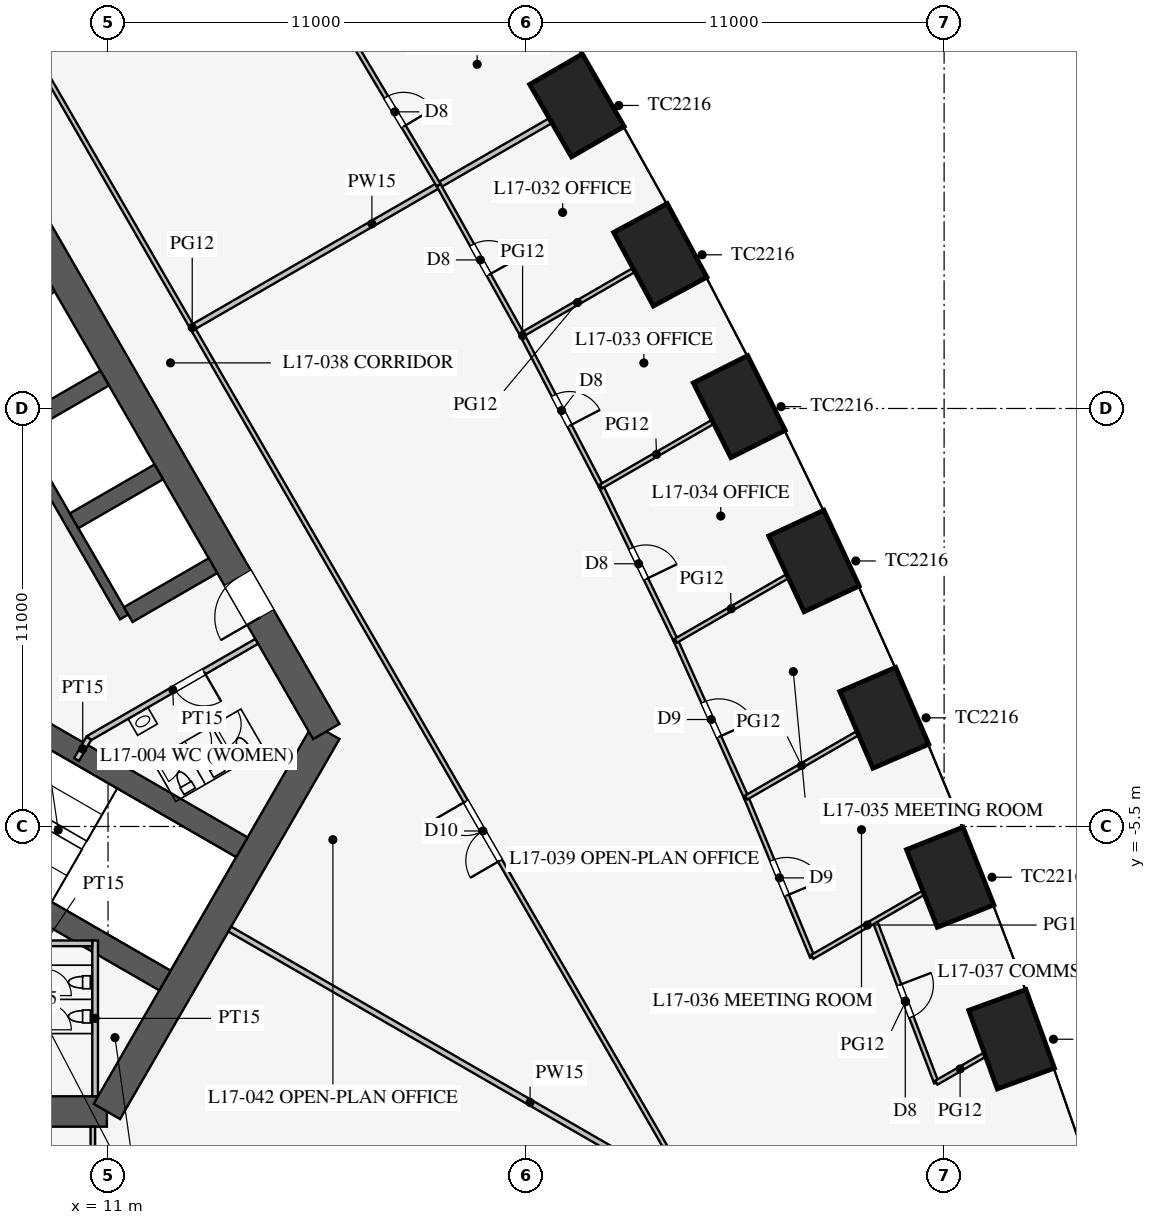
"""IFC4 building model, lengths in metres.
Left out: names, types, materials, properties, quantities, classifications, styles, units other than length and angle.
Written with IfcOpenShell. Run it as: python <this file> out.ifc"""

import sys

from ifc_helpers import new_model, si_unit, direction, frame, frame_2d, origin, origin_2d, place, context, subcontext, project, spatial, rectangle, extrude, element, fill, save


model = new_model("IFC4")
c1 = context("Model", 3, precision=1e-05, world=origin(), true_north=direction((0.0, 1.0)))
c2 = subcontext(c1, "Body", "Model", "MODEL_VIEW")
j1 = project(units=[si_unit("LENGTHUNIT", "METRE"), si_unit("PLANEANGLEUNIT", "RADIAN")], contexts=[c1])
p1 = place(None, origin())
s1 = spatial("IfcSite", under=j1, at=p1, CompositionType="ELEMENT")
p2 = place(p1, origin())
s2 = spatial("IfcBuilding", under=s1, at=p2, CompositionType="ELEMENT")
p3 = place(p2, frame((0.0, 0.0, 75.3)))
s3 = spatial("IfcBuildingStorey", under=s2, at=p3, CompositionType="ELEMENT", Elevation=75.3)
for number, where, z_axis, x_axis in (
    (1, (34.776, -11.099, 0.0), (0.0, 0.0, 1.0), (-0.342, 0.94, 0.0)),
    (2, (33.16, -6.836, 0.0), (0.0, 0.0, 1.0), (-0.369, 0.929, 0.0)),
    (3, (31.426, -2.641, 0.0), (0.0, 0.0, 1.0), (-0.396, 0.918, 0.0)),
    (4, (29.576, 1.487, 0.0), (0.0, 0.0, 1.0), (-0.423, 0.906, 0.0)),
    (5, (27.611, 5.549, 0.0), (0.0, 0.0, 1.0), (-0.449, 0.894, 0.0)),
    (6, (25.531, 9.544, 0.0), (0.0, 0.0, 1.0), (-0.475, 0.88, 0.0)),
    (7, (23.338, 13.474, 0.0), (0.0, 0.0, 1.0), (-0.5, 0.866, 0.0)),
):
    element("IfcColumn", number, at=place(p3, frame(where, z_axis=z_axis, x_axis=x_axis)), inside=s3, PredefinedType="COLUMN", context=c2, shape_type="SweptSolid", body=[
        extrude(rectangle(XDim=2.2, YDim=1.6, at=origin_2d()), origin(), (0.0, 0.0, 1.0), 4.2),
    ])
p4 = place(p3, frame((-10.97, -13.0, 0.0), z_axis=(0.0, 0.0, 1.0), x_axis=(1.0, 0.0, 0.0)))
e8 = element("IfcWall", 8, at=p4, inside=s3, PredefinedType="SHEAR", context=c2, shape_type="SweptSolid", body=[
    extrude(rectangle(XDim=21.939, YDim=0.8, at=frame_2d((10.97, 0.0))), origin(), (0.0, 0.0, 1.0), 4.2),
])
p5 = place(p4, frame((17.27, 0.0, 0.0)))
e9 = element("IfcOpeningElement", 9, at=p5, cuts=e8, PredefinedType="OPENING", context=c2, shape_type="SweptSolid", body=[
    extrude(rectangle(XDim=1.2, YDim=2.1, at=frame_2d((0.6, 1.05))), frame((0.0, 0.41, 0.0), z_axis=(0.0, -1.0, 0.0), x_axis=(1.0, 0.0, 0.0)), (0.0, 0.0, 1.0), 0.82),
])
p6 = place(p4, frame((3.47, 0.0, 0.0)))
e10 = element("IfcOpeningElement", 10, at=p6, cuts=e8, PredefinedType="OPENING", context=c2, shape_type="SweptSolid", body=[
    extrude(rectangle(XDim=1.2, YDim=2.1, at=frame_2d((0.6, 1.05))), frame((0.0, 0.41, 0.0), z_axis=(0.0, -1.0, 0.0), x_axis=(1.0, 0.0, 0.0)), (0.0, 0.0, 1.0), 0.82),
])
p7 = place(p3, frame((10.97, -13.0, 0.0), z_axis=(0.0, 0.0, 1.0), x_axis=(0.499995765644, 0.866027848477, 0.0)))
e11 = element("IfcWall", 11, at=p7, inside=s3, PredefinedType="SHEAR", context=c2, shape_type="SweptSolid", body=[
    extrude(rectangle(XDim=11.547, YDim=0.8, at=frame_2d((5.773, 0.0))), origin(), (0.0, 0.0, 1.0), 4.2),
])
p8 = place(p3, frame((16.743, -3.0, 0.0), z_axis=(0.0, 0.0, 1.0), x_axis=(-0.500002442456, 0.866023993627, 0.0)))
e12 = element("IfcWall", 12, at=p8, inside=s3, PredefinedType="SHEAR", context=c2, shape_type="SweptSolid", body=[
    extrude(rectangle(XDim=21.939, YDim=0.8, at=frame_2d((10.97, 0.0))), origin(), (0.0, 0.0, 1.0), 4.2),
])
p9 = place(p8, frame((17.27, 0.0, 0.0)))
e13 = element("IfcOpeningElement", 13, at=p9, cuts=e12, PredefinedType="OPENING", context=c2, shape_type="SweptSolid", body=[
    extrude(rectangle(XDim=1.2, YDim=2.1, at=frame_2d((0.6, 1.05))), frame((0.0, 0.41, 0.0), z_axis=(0.0, -1.0, 0.0), x_axis=(1.0, 0.0, 0.0)), (0.0, 0.0, 1.0), 0.82),
])
p10 = place(p8, frame((3.47, 0.0, 0.0)))
e14 = element("IfcOpeningElement", 14, at=p10, cuts=e12, PredefinedType="OPENING", context=c2, shape_type="SweptSolid", body=[
    extrude(rectangle(XDim=1.2, YDim=2.1, at=frame_2d((0.6, 1.05))), frame((0.0, 0.41, 0.0), z_axis=(0.0, -1.0, 0.0), x_axis=(1.0, 0.0, 0.0)), (0.0, 0.0, 1.0), 0.82),
])
p11 = place(p3, frame((11.424, 0.014, 0.0), z_axis=(0.0, 0.0, 1.0), x_axis=(-0.500001763848, 0.866024385424, 0.0)))
e15 = element("IfcWall", 15, at=p11, inside=s3, PredefinedType="SHEAR", context=c2, shape_type="SweptSolid", body=[
    extrude(rectangle(XDim=11.4, YDim=0.25, at=frame_2d((5.7, 0.0))), origin(), (0.0, 0.0, 1.0), 4.2),
])
for number, where, z_axis, x_axis in (
    (16, (11.532, 0.076, 0.0), (0.0, 0.0, 1.0), (0.866, 0.5, 0.0)),
    (17, (10.107, 2.544, 0.0), (0.0, 0.0, 1.0), (0.866, 0.5, 0.0)),
    (18, (8.682, 5.012, 0.0), (0.0, 0.0, 1.0), (0.866, 0.5, 0.0)),
    (19, (7.257, 7.481, 0.0), (0.0, 0.0, 1.0), (0.866, 0.5, 0.0)),
):
    element("IfcWall", number, at=place(p3, frame(where, z_axis=z_axis, x_axis=x_axis)), inside=s3, PredefinedType="SHEAR", context=c2, shape_type="SweptSolid", body=[
        extrude(rectangle(XDim=2.575, YDim=0.45, at=frame_2d((1.288, 0.0))), origin(), (0.0, 0.0, 1.0), 4.2),
    ])
for number, where, z_axis, x_axis in (
    (20, (4.638, -5.016, 0.0), (0.0, 0.0, 1.0), (0.866, -0.5, 0.0)),
    (21, (6.663, -1.509, 0.0), (0.0, 0.0, 1.0), (0.866, -0.5, 0.0)),
):
    element("IfcWall", number, at=place(p3, frame(where, z_axis=z_axis, x_axis=x_axis)), inside=s3, PredefinedType="SHEAR", context=c2, shape_type="SweptSolid", body=[
        extrude(rectangle(XDim=9.075, YDim=0.6, at=frame_2d((4.538, 0.0))), origin(), (0.0, 0.0, 1.0), 4.2),
    ])
p12 = place(p3, frame((10.495, -3.178, 0.0), z_axis=(0.0, 0.0, 1.0), x_axis=(0.86602216432, 0.500005610874, 0.0)))
e22 = element("IfcWall", 22, at=p12, inside=s3, PredefinedType="PARTITIONING", context=c2, shape_type="SweptSolid", body=[
    extrude(rectangle(XDim=5.1, YDim=0.15, at=frame_2d((2.55, 0.0))), origin(), (0.0, 0.0, 1.0), 4.0),
])
p13 = place(p12, frame((2.6, 0.0, 0.0)))
e23 = element("IfcOpeningElement", 23, at=p13, cuts=e22, PredefinedType="OPENING", context=c2, shape_type="SweptSolid", body=[
    extrude(rectangle(XDim=0.9, YDim=2.1, at=frame_2d((0.45, 1.05))), frame((0.0, 0.085, 0.0), z_axis=(0.0, -1.0, 0.0), x_axis=(1.0, 0.0, 0.0)), (0.0, 0.0, 1.0), 0.17),
])
p14 = place(p3, frame((10.495, -3.178, 0.0), z_axis=(0.0, 0.0, 1.0), x_axis=(-0.499842556608, -0.866116284689, 0.0)))
e24 = element("IfcWall", 24, at=p14, inside=s3, PredefinedType="PARTITIONING", context=c2, shape_type="SweptSolid", body=[
    extrude(rectangle(XDim=0.645, YDim=0.15, at=frame_2d((0.323, 0.0))), origin(), (0.0, 0.0, 1.0), 4.0),
])
p15 = place(p3, frame((10.66, -8.5, 0.0), z_axis=(0.0, 0.0, 1.0), x_axis=(0.0, -1.0, 0.0)))
e25 = element("IfcWall", 25, at=p15, inside=s3, PredefinedType="PARTITIONING", context=c2, shape_type="SweptSolid", body=[
    extrude(rectangle(XDim=4.1, YDim=0.15, at=frame_2d((2.05, 0.0))), origin(), (0.0, 0.0, 1.0), 4.0),
])
p16 = place(p3, frame((8.075, -8.575, 0.0), z_axis=(0.0, 0.0, 1.0), x_axis=(1.0, 0.0, 0.0)))
e26 = element("IfcWall", 26, at=p16, inside=s3, PredefinedType="PARTITIONING", context=c2, shape_type="SweptSolid", body=[
    extrude(rectangle(XDim=2.51, YDim=0.15, at=frame_2d((1.255, 0.0))), origin(), (0.0, 0.0, 1.0), 4.0),
])
p17 = place(p3, frame((14.203, -8.2, 0.0), z_axis=(0.0, 0.0, 1.0), x_axis=(0.866024965723, -0.500000758745, 0.0)))
e27 = element("IfcWall", 27, at=p17, inside=s3, PredefinedType="PARTITIONING", context=c2, shape_type="SweptSolid", body=[
    extrude(rectangle(XDim=18.25, YDim=0.15, at=frame_2d((9.125, 0.0))), origin(), (0.0, 0.0, 1.0), 2.3),
])
p18 = place(p3, frame((10.6, -13.4, 0.0), z_axis=(0.0, 0.0, 1.0), x_axis=(0.0, -1.0, 0.0)))
e28 = element("IfcWall", 28, at=p18, inside=s3, PredefinedType="PARTITIONING", context=c2, shape_type="SweptSolid", body=[
    extrude(rectangle(XDim=4.0, YDim=0.12, at=frame_2d((2.0, 0.0))), origin(), (0.0, 0.0, 1.0), 2.9),
])
p19 = place(p3, frame((13.268, 7.66, 0.0), z_axis=(0.0, 0.0, 1.0), x_axis=(0.866019550038, 0.50001013885, 0.0)))
e29 = element("IfcWall", 29, at=p19, inside=s3, PredefinedType="PARTITIONING", context=c2, shape_type="SweptSolid", body=[
    extrude(rectangle(XDim=10.799, YDim=0.15, at=frame_2d((5.399, 0.0))), origin(), (0.0, 0.0, 1.0), 2.8),
])
p20 = place(p3, frame((26.415, -15.231, 0.0), z_axis=(0.0, 0.0, 1.0), x_axis=(-0.50000091641, 0.866024874695, 0.0)))
e30 = element("IfcWall", 30, at=p20, inside=s3, PredefinedType="PARTITIONING", context=c2, shape_type="SweptSolid", body=[
    extrude(rectangle(XDim=52.796, YDim=0.12, at=frame_2d((26.398, 0.0))), origin(), (0.0, 0.0, 1.0), 2.9),
])
p21 = place(p20, frame((10.2, 0.0, 0.15)))
e31 = element("IfcOpeningElement", 31, at=p21, cuts=e30, PredefinedType="OPENING", context=c2, shape_type="SweptSolid", body=[
    extrude(rectangle(XDim=1.8, YDim=2.1, at=frame_2d((0.9, 1.05))), frame((0.0, 0.07, 0.0), z_axis=(0.0, -1.0, 0.0), x_axis=(1.0, 0.0, 0.0)), (0.0, 0.0, 1.0), 0.14),
])
p22 = place(p20, frame((40.8, 0.0, 0.15)))
e32 = element("IfcOpeningElement", 32, at=p22, cuts=e30, PredefinedType="OPENING", context=c2, shape_type="SweptSolid", body=[
    extrude(rectangle(XDim=1.8, YDim=2.1, at=frame_2d((0.9, 1.05))), frame((0.0, 0.07, 0.0), z_axis=(0.0, -1.0, 0.0), x_axis=(1.0, 0.0, 0.0)), (0.0, 0.0, 1.0), 0.14),
])
p23 = place(p3, frame((19.701, 11.374, 0.0), z_axis=(0.0, 0.0, 1.0), x_axis=(-0.512483962191, 0.858696796604, 0.0)))
e33 = element("IfcWall", 33, at=p23, inside=s3, PredefinedType="PARTITIONING", context=c2, shape_type="SweptSolid", body=[
    extrude(rectangle(XDim=4.5, YDim=0.12, at=frame_2d((2.25, 0.0))), origin(), (0.0, 0.0, 1.0), 2.9),
])
p24 = place(p23, frame((1.8, 0.0, 0.15)))
e34 = element("IfcOpeningElement", 34, at=p24, cuts=e33, PredefinedType="OPENING", context=c2, shape_type="SweptSolid", body=[
    extrude(rectangle(XDim=0.9, YDim=2.1, at=frame_2d((0.45, 1.05))), frame((0.0, 0.07, 0.0), z_axis=(0.0, -1.0, 0.0), x_axis=(1.0, 0.0, 0.0)), (0.0, 0.0, 1.0), 0.14),
])
p25 = place(p3, frame((25.941, -0.611, 0.0), z_axis=(0.0, 0.0, 1.0), x_axis=(-0.435857917556, 0.900015486369, 0.0)))
e35 = element("IfcWall", 35, at=p25, inside=s3, PredefinedType="PARTITIONING", context=c2, shape_type="SweptSolid", body=[
    extrude(rectangle(XDim=4.512, YDim=0.12, at=frame_2d((2.256, 0.0))), origin(), (0.0, 0.0, 1.0), 2.9),
])
p26 = place(p25, frame((1.8, 0.0, 0.15)))
e36 = element("IfcOpeningElement", 36, at=p26, cuts=e35, PredefinedType="OPENING", context=c2, shape_type="SweptSolid", body=[
    extrude(rectangle(XDim=0.9, YDim=2.1, at=frame_2d((0.45, 1.05))), frame((0.0, 0.07, 0.0), z_axis=(0.0, -1.0, 0.0), x_axis=(1.0, 0.0, 0.0)), (0.0, 0.0, 1.0), 0.14),
])
p27 = place(p3, frame((27.793, -4.738, 0.0), z_axis=(0.0, 0.0, 1.0), x_axis=(-0.409451055745, 0.912332084796, 0.0)))
e37 = element("IfcWall", 37, at=p27, inside=s3, PredefinedType="PARTITIONING", context=c2, shape_type="SweptSolid", body=[
    extrude(rectangle(XDim=4.523, YDim=0.12, at=frame_2d((2.262, 0.0))), origin(), (0.0, 0.0, 1.0), 2.9),
])
p28 = place(p27, frame((1.75, 0.0, 0.15)))
e38 = element("IfcOpeningElement", 38, at=p28, cuts=e37, PredefinedType="OPENING", context=c2, shape_type="SweptSolid", body=[
    extrude(rectangle(XDim=1.0, YDim=2.1, at=frame_2d((0.5, 1.05))), frame((0.0, 0.07, 0.0), z_axis=(0.0, -1.0, 0.0), x_axis=(1.0, 0.0, 0.0)), (0.0, 0.0, 1.0), 0.14),
])
p29 = place(p3, frame((29.53, -8.932, 0.0), z_axis=(0.0, 0.0, 1.0), x_axis=(-0.382639984525, 0.923897527999, 0.0)))
e39 = element("IfcWall", 39, at=p29, inside=s3, PredefinedType="PARTITIONING", context=c2, shape_type="SweptSolid", body=[
    extrude(rectangle(XDim=4.539, YDim=0.12, at=frame_2d((2.27, 0.0))), origin(), (0.0, 0.0, 1.0), 2.9),
])
p30 = place(p29, frame((1.75, 0.0, 0.15)))
e40 = element("IfcOpeningElement", 40, at=p30, cuts=e39, PredefinedType="OPENING", context=c2, shape_type="SweptSolid", body=[
    extrude(rectangle(XDim=1.0, YDim=2.1, at=frame_2d((0.5, 1.05))), frame((0.0, 0.07, 0.0), z_axis=(0.0, -1.0, 0.0), x_axis=(1.0, 0.0, 0.0)), (0.0, 0.0, 1.0), 0.14),
])
p31 = place(p3, frame((32.795, -12.242, 0.0), z_axis=(0.0, 0.0, 1.0), x_axis=(-0.355369393324, 0.934725946087, 0.0)))
e41 = element("IfcWall", 41, at=p31, inside=s3, PredefinedType="PARTITIONING", context=c2, shape_type="SweptSolid", body=[
    extrude(rectangle(XDim=4.558, YDim=0.12, at=frame_2d((2.279, 0.0))), origin(), (0.0, 0.0, 1.0), 2.9),
])
p32 = place(p31, frame((1.85, 0.0, 0.15)))
e42 = element("IfcOpeningElement", 42, at=p32, cuts=e41, PredefinedType="OPENING", context=c2, shape_type="SweptSolid", body=[
    extrude(rectangle(XDim=0.9, YDim=2.1, at=frame_2d((0.45, 1.05))), frame((0.0, 0.07, 0.0), z_axis=(0.0, -1.0, 0.0), x_axis=(1.0, 0.0, 0.0)), (0.0, 0.0, 1.0), 0.14),
])
p33 = place(p3, frame((21.895, 7.445, 0.0), z_axis=(0.0, 0.0, 1.0), x_axis=(-0.487415216275, 0.87317031955, 0.0)))
e43 = element("IfcWall", 43, at=p33, inside=s3, PredefinedType="PARTITIONING", context=c2, shape_type="SweptSolid", body=[
    extrude(rectangle(XDim=4.5, YDim=0.12, at=frame_2d((2.25, 0.0))), origin(), (0.0, 0.0, 1.0), 2.9),
])
p34 = place(p33, frame((1.8, 0.0, 0.15)))
e44 = element("IfcOpeningElement", 44, at=p34, cuts=e43, PredefinedType="OPENING", context=c2, shape_type="SweptSolid", body=[
    extrude(rectangle(XDim=0.9, YDim=2.1, at=frame_2d((0.45, 1.05))), frame((0.0, 0.07, 0.0), z_axis=(0.0, -1.0, 0.0), x_axis=(1.0, 0.0, 0.0)), (0.0, 0.0, 1.0), 0.14),
])
p35 = place(p3, frame((23.975, 3.449, 0.0), z_axis=(0.0, 0.0, 1.0), x_axis=(-0.461810056307, 0.886978845235, 0.0)))
e45 = element("IfcWall", 45, at=p35, inside=s3, PredefinedType="PARTITIONING", context=c2, shape_type="SweptSolid", body=[
    extrude(rectangle(XDim=4.504, YDim=0.12, at=frame_2d((2.252, 0.0))), origin(), (0.0, 0.0, 1.0), 2.9),
])
p36 = place(p35, frame((1.8, 0.0, 0.15)))
e46 = element("IfcOpeningElement", 46, at=p36, cuts=e45, PredefinedType="OPENING", context=c2, shape_type="SweptSolid", body=[
    extrude(rectangle(XDim=0.9, YDim=2.1, at=frame_2d((0.45, 1.05))), frame((0.0, 0.07, 0.0), z_axis=(0.0, -1.0, 0.0), x_axis=(1.0, 0.0, 0.0)), (0.0, 0.0, 1.0), 0.14),
])
p37 = place(p3, frame((25.941, -0.611, 0.0), z_axis=(0.0, 0.0, 1.0), x_axis=(0.866023625329, 0.500003080363, 0.0)))
e47 = element("IfcWall", 47, at=p37, inside=s3, PredefinedType="PARTITIONING", context=c2, shape_type="SweptSolid", body=[
    extrude(rectangle(XDim=3.364, YDim=0.12, at=frame_2d((1.682, 0.0))), origin(), (0.0, 0.0, 1.0), 2.6),
])
p38 = place(p3, frame((27.793, -4.738, 0.0), z_axis=(0.0, 0.0, 1.0), x_axis=(0.866029446706, 0.499992997389, 0.0)))
e48 = element("IfcWall", 48, at=p38, inside=s3, PredefinedType="PARTITIONING", context=c2, shape_type="SweptSolid", body=[
    extrude(rectangle(XDim=3.359, YDim=0.12, at=frame_2d((1.679, 0.0))), origin(), (0.0, 0.0, 1.0), 2.6),
])
p39 = place(p3, frame((29.53, -8.932, 0.0), z_axis=(0.0, 0.0, 1.0), x_axis=(0.866038859646, 0.49997669304, 0.0)))
e49 = element("IfcWall", 49, at=p39, inside=s3, PredefinedType="PARTITIONING", context=c2, shape_type="SweptSolid", body=[
    extrude(rectangle(XDim=3.353, YDim=0.12, at=frame_2d((1.676, 0.0))), origin(), (0.0, 0.0, 1.0), 2.8),
])
p40 = place(p3, frame((32.795, -12.242, 0.0), z_axis=(0.0, 0.0, 1.0), x_axis=(0.866019559589, 0.500010122307, 0.0)))
e50 = element("IfcWall", 50, at=p40, inside=s3, PredefinedType="PARTITIONING", context=c2, shape_type="SweptSolid", body=[
    extrude(rectangle(XDim=1.445, YDim=0.12, at=frame_2d((0.722, 0.0))), origin(), (0.0, 0.0, 1.0), 2.9),
])
p41 = place(p3, frame((21.895, 7.445, 0.0), z_axis=(0.0, 0.0, 1.0), x_axis=(0.866022675988, 0.500004724652, 0.0)))
e51 = element("IfcWall", 51, at=p41, inside=s3, PredefinedType="PARTITIONING", context=c2, shape_type="SweptSolid", body=[
    extrude(rectangle(XDim=3.369, YDim=0.12, at=frame_2d((1.685, 0.0))), origin(), (0.0, 0.0, 1.0), 2.8),
])
p42 = place(p3, frame((23.975, 3.449, 0.0), z_axis=(0.0, 0.0, 1.0), x_axis=(0.866039498442, 0.499975586543, 0.0)))
e52 = element("IfcWall", 52, at=p42, inside=s3, PredefinedType="PARTITIONING", context=c2, shape_type="SweptSolid", body=[
    extrude(rectangle(XDim=3.367, YDim=0.12, at=frame_2d((1.684, 0.0))), origin(), (0.0, 0.0, 1.0), 2.8),
])
p43 = place(p13, frame((0.9, 0.0, 0.0), z_axis=(0.0, 0.0, 1.0), x_axis=(-1.0, 0.0, 0.0)))
e53 = element("IfcDoor", 53, at=p43, inside=s3, OperationType="SINGLE_SWING_LEFT", PredefinedType="DOOR", context=c2, shape_type="SweptSolid", body=[
    extrude(rectangle(XDim=0.9, YDim=2.1, at=frame_2d((0.45, 1.05))), frame((0.0, 0.025, 0.0), z_axis=(0.0, -1.0, 0.0), x_axis=(1.0, 0.0, 0.0)), (0.0, 0.0, 1.0), 0.05),
])
fill(e23, e53)
p44 = place(p10, origin())
e54 = element("IfcDoor", 54, at=p44, inside=s3, OperationType="SINGLE_SWING_LEFT", PredefinedType="DOOR", context=c2, shape_type="SweptSolid", body=[
    extrude(rectangle(XDim=1.2, YDim=2.1, at=frame_2d((0.6, 1.05))), frame((0.0, 0.025, 0.0), z_axis=(0.0, -1.0, 0.0), x_axis=(1.0, 0.0, 0.0)), (0.0, 0.0, 1.0), 0.05),
])
fill(e14, e54)
p45 = place(p24, frame((0.9, 0.0, 0.0), z_axis=(0.0, 0.0, 1.0), x_axis=(-1.0, 0.0, 0.0)))
e55 = element("IfcDoor", 55, at=p45, inside=s3, OperationType="SINGLE_SWING_RIGHT", PredefinedType="DOOR", context=c2, shape_type="SweptSolid", body=[
    extrude(rectangle(XDim=0.9, YDim=2.1, at=frame_2d((0.45, 1.05))), frame((0.0, 0.025, 0.0), z_axis=(0.0, -1.0, 0.0), x_axis=(1.0, 0.0, 0.0)), (0.0, 0.0, 1.0), 0.05),
])
fill(e34, e55)
p46 = place(p34, frame((0.9, 0.0, 0.0), z_axis=(0.0, 0.0, 1.0), x_axis=(-1.0, 0.0, 0.0)))
e56 = element("IfcDoor", 56, at=p46, inside=s3, OperationType="SINGLE_SWING_RIGHT", PredefinedType="DOOR", context=c2, shape_type="SweptSolid", body=[
    extrude(rectangle(XDim=0.9, YDim=2.1, at=frame_2d((0.45, 1.05))), frame((0.0, 0.025, 0.0), z_axis=(0.0, -1.0, 0.0), x_axis=(1.0, 0.0, 0.0)), (0.0, 0.0, 1.0), 0.05),
])
fill(e44, e56)
p47 = place(p36, frame((0.9, 0.0, 0.0), z_axis=(0.0, 0.0, 1.0), x_axis=(-1.0, 0.0, 0.0)))
e57 = element("IfcDoor", 57, at=p47, inside=s3, OperationType="SINGLE_SWING_RIGHT", PredefinedType="DOOR", context=c2, shape_type="SweptSolid", body=[
    extrude(rectangle(XDim=0.9, YDim=2.1, at=frame_2d((0.45, 1.05))), frame((0.0, 0.025, 0.0), z_axis=(0.0, -1.0, 0.0), x_axis=(1.0, 0.0, 0.0)), (0.0, 0.0, 1.0), 0.05),
])
fill(e46, e57)
p48 = place(p26, frame((0.9, 0.0, 0.0), z_axis=(0.0, 0.0, 1.0), x_axis=(-1.0, 0.0, 0.0)))
e58 = element("IfcDoor", 58, at=p48, inside=s3, OperationType="SINGLE_SWING_RIGHT", PredefinedType="DOOR", context=c2, shape_type="SweptSolid", body=[
    extrude(rectangle(XDim=0.9, YDim=2.1, at=frame_2d((0.45, 1.05))), frame((0.0, 0.025, 0.0), z_axis=(0.0, -1.0, 0.0), x_axis=(1.0, 0.0, 0.0)), (0.0, 0.0, 1.0), 0.05),
])
fill(e36, e58)
p49 = place(p28, frame((1.0, 0.0, 0.0), z_axis=(0.0, 0.0, 1.0), x_axis=(-1.0, 0.0, 0.0)))
e59 = element("IfcDoor", 59, at=p49, inside=s3, OperationType="SINGLE_SWING_RIGHT", PredefinedType="DOOR", context=c2, shape_type="SweptSolid", body=[
    extrude(rectangle(XDim=1.0, YDim=2.1, at=frame_2d((0.5, 1.05))), frame((0.0, 0.025, 0.0), z_axis=(0.0, -1.0, 0.0), x_axis=(1.0, 0.0, 0.0)), (0.0, 0.0, 1.0), 0.05),
])
fill(e38, e59)
p50 = place(p30, frame((1.0, 0.0, 0.0), z_axis=(0.0, 0.0, 1.0), x_axis=(-1.0, 0.0, 0.0)))
e60 = element("IfcDoor", 60, at=p50, inside=s3, OperationType="SINGLE_SWING_RIGHT", PredefinedType="DOOR", context=c2, shape_type="SweptSolid", body=[
    extrude(rectangle(XDim=1.0, YDim=2.1, at=frame_2d((0.5, 1.05))), frame((0.0, 0.025, 0.0), z_axis=(0.0, -1.0, 0.0), x_axis=(1.0, 0.0, 0.0)), (0.0, 0.0, 1.0), 0.05),
])
fill(e40, e60)
p51 = place(p32, frame((0.9, 0.0, 0.0), z_axis=(0.0, 0.0, 1.0), x_axis=(-1.0, 0.0, 0.0)))
e61 = element("IfcDoor", 61, at=p51, inside=s3, OperationType="SINGLE_SWING_LEFT", PredefinedType="DOOR", context=c2, shape_type="SweptSolid", body=[
    extrude(rectangle(XDim=0.9, YDim=2.1, at=frame_2d((0.45, 1.05))), frame((0.0, 0.025, 0.0), z_axis=(0.0, -1.0, 0.0), x_axis=(1.0, 0.0, 0.0)), (0.0, 0.0, 1.0), 0.05),
])
fill(e42, e61)
p52 = place(p21, origin())
e62 = element("IfcDoor", 62, at=p52, inside=s3, OperationType="DOUBLE_DOOR_SINGLE_SWING", PredefinedType="DOOR", context=c2, shape_type="SweptSolid", body=[
    extrude(rectangle(XDim=1.8, YDim=2.1, at=frame_2d((0.9, 1.05))), frame((0.0, 0.025, 0.0), z_axis=(0.0, -1.0, 0.0), x_axis=(1.0, 0.0, 0.0)), (0.0, 0.0, 1.0), 0.05),
])
fill(e31, e62)
save(model, sys.argv[1])
